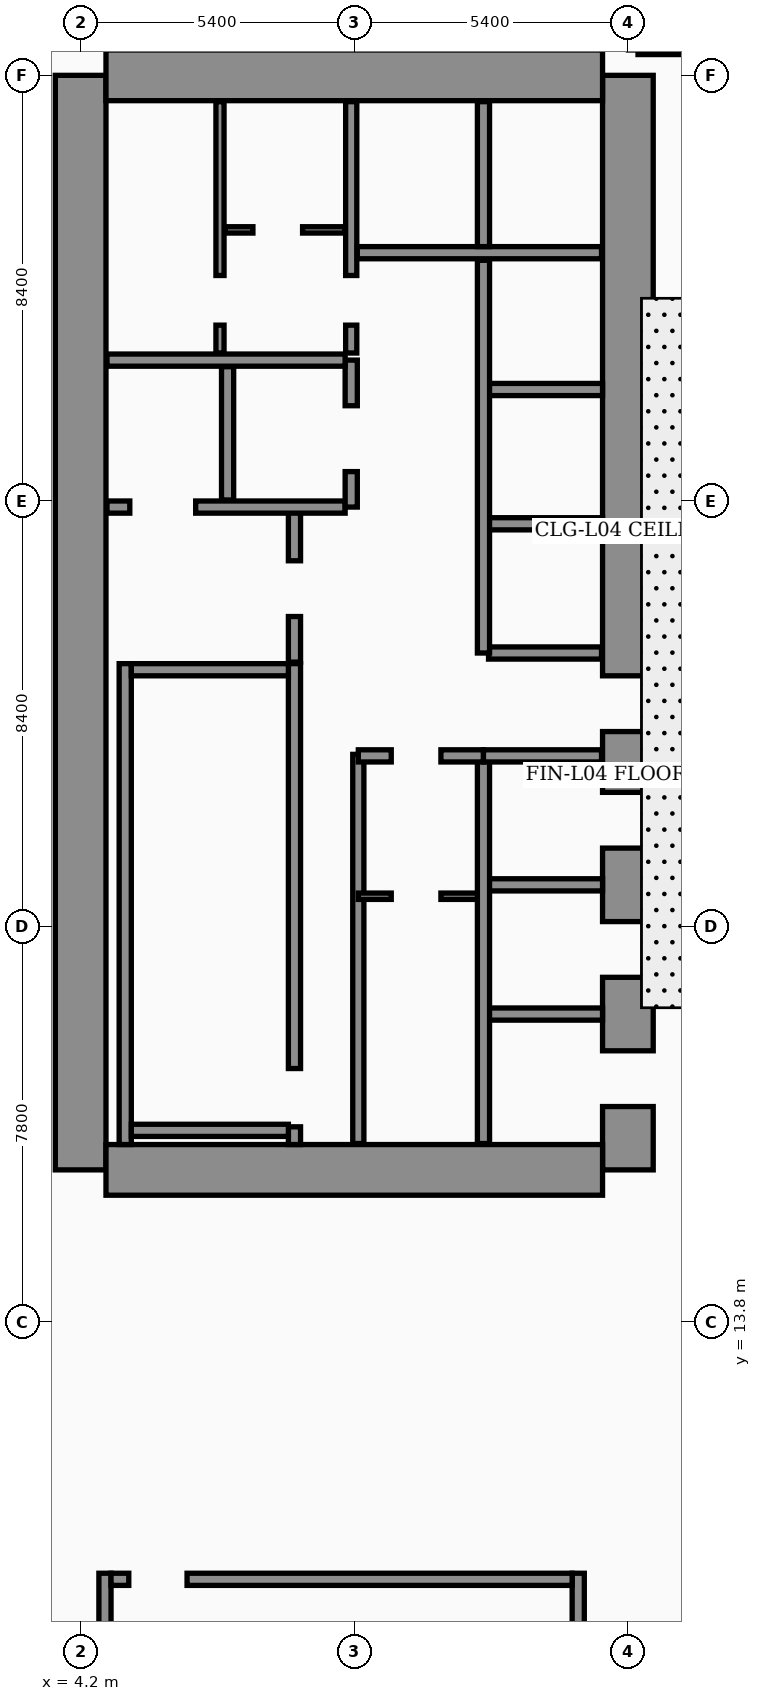
"""IFC4 building model, lengths in metres.
Left out: names, types, materials, properties, quantities, classifications, styles, units other than length and angle.
Written with IfcOpenShell. Run it as: python <this file> out.ifc"""

import sys

from ifc_helpers import new_model, si_unit, direction, frame, frame_2d, origin, place, context, subcontext, project, spatial, rectangle, extrude, element, fill, save


model = new_model("IFC4")
c1 = context("Model", 3, precision=1e-05, world=origin(), true_north=direction((0.0, 1.0)))
c2 = subcontext(c1, "Body", "Model", "MODEL_VIEW")
j1 = project(units=[si_unit("LENGTHUNIT", "METRE"), si_unit("PLANEANGLEUNIT", "RADIAN")], contexts=[c1])
p1 = place(None, origin())
s1 = spatial("IfcSite", under=j1, at=p1, CompositionType="ELEMENT")
p2 = place(p1, origin())
s2 = spatial("IfcBuilding", under=s1, at=p2, CompositionType="ELEMENT")
p3 = place(p2, frame((0.0, 0.0, 22.0)))
s3 = spatial("IfcBuildingStorey", under=s2, at=p3, CompositionType="ELEMENT", Elevation=22.0)
p4 = place(p3, frame((4.2, 16.8, 0.0), z_axis=(0.0, 0.0, 1.0), x_axis=(0.0, 1.0, 0.0)))
e1 = element("IfcWall", 1, at=p4, inside=s3, PredefinedType="SHEAR", context=c2, shape_type="SweptSolid", body=[
    extrude(rectangle(XDim=21.6, YDim=1.0, at=frame_2d((10.8, 0.0))), origin(), (0.0, 0.0, 1.0), 4.76),
])
p5 = place(p3, frame((15.0, 16.8, 0.0), z_axis=(0.0, 0.0, 1.0), x_axis=(0.0, 1.0, 0.0)))
e2 = element("IfcWall", 2, at=p5, inside=s3, PredefinedType="SHEAR", context=c2, shape_type="SweptSolid", body=[
    extrude(rectangle(XDim=21.6, YDim=1.0, at=frame_2d((10.8, 0.0))), origin(), (0.0, 0.0, 1.0), 4.76),
])
p6 = place(p5, frame((8.65, 0.0, 0.0)))
e3 = element("IfcOpeningElement", 3, at=p6, cuts=e2, PredefinedType="OPENING", context=c2, shape_type="SweptSolid", body=[
    extrude(rectangle(XDim=1.1, YDim=2.2, at=frame_2d((0.55, 1.1))), frame((0.0, 0.51, 0.0), z_axis=(0.0, -1.0, 0.0), x_axis=(1.0, 0.0, 0.0)), (0.0, 0.0, 1.0), 1.02),
])
p7 = place(p5, frame((1.25, 0.0, 0.0)))
e4 = element("IfcOpeningElement", 4, at=p7, cuts=e2, PredefinedType="OPENING", context=c2, shape_type="SweptSolid", body=[
    extrude(rectangle(XDim=1.1, YDim=2.2, at=frame_2d((0.55, 1.1))), frame((0.0, 0.51, 0.0), z_axis=(0.0, -1.0, 0.0), x_axis=(1.0, 0.0, 0.0)), (0.0, 0.0, 1.0), 1.02),
])
p8 = place(p5, frame((3.8, 0.0, 0.0)))
e5 = element("IfcOpeningElement", 5, at=p8, cuts=e2, PredefinedType="OPENING", context=c2, shape_type="SweptSolid", body=[
    extrude(rectangle(XDim=1.1, YDim=2.2, at=frame_2d((0.55, 1.1))), frame((0.0, 0.51, 0.0), z_axis=(0.0, -1.0, 0.0), x_axis=(1.0, 0.0, 0.0)), (0.0, 0.0, 1.0), 1.02),
])
p9 = place(p5, frame((6.35, 0.0, 0.0)))
e6 = element("IfcOpeningElement", 6, at=p9, cuts=e2, PredefinedType="OPENING", context=c2, shape_type="SweptSolid", body=[
    extrude(rectangle(XDim=1.1, YDim=2.2, at=frame_2d((0.55, 1.1))), frame((0.0, 0.51, 0.0), z_axis=(0.0, -1.0, 0.0), x_axis=(1.0, 0.0, 0.0)), (0.0, 0.0, 1.0), 1.02),
])
for number, where, z_axis, x_axis in (
    (7, (4.7, 38.4, 0.0), (0.0, 0.0, 1.0), (1.0, 0.0, 0.0)),
    (8, (4.7, 16.8, 0.0), (0.0, 0.0, 1.0), (1.0, 0.0, 0.0)),
):
    element("IfcWall", number, at=place(p3, frame(where, z_axis=z_axis, x_axis=x_axis)), inside=s3, PredefinedType="SHEAR", context=c2, shape_type="SweptSolid", body=[
        extrude(rectangle(XDim=9.8, YDim=1.0, at=frame_2d((4.9, 0.0))), origin(), (0.0, 0.0, 1.0), 4.76),
    ])
p10 = place(p3, frame((5.08, 17.3, 0.0), z_axis=(0.0, 0.0, 1.0), x_axis=(0.0, 1.0, 0.0)))
e9 = element("IfcWall", 9, at=p10, inside=s3, PredefinedType="SOLIDWALL", context=c2, shape_type="SweptSolid", body=[
    extrude(rectangle(XDim=9.49, YDim=0.24, at=frame_2d((4.745, 0.0))), origin(), (0.0, 0.0, 1.0), 4.76),
])
p11 = place(p3, frame((8.42, 17.3, 0.0), z_axis=(0.0, 0.0, 1.0), x_axis=(0.0, 1.0, 0.0)))
e10 = element("IfcWall", 10, at=p11, inside=s3, PredefinedType="SOLIDWALL", context=c2, shape_type="SweptSolid", body=[
    extrude(rectangle(XDim=9.49, YDim=0.24, at=frame_2d((4.745, 0.0))), origin(), (0.0, 0.0, 1.0), 4.76),
])
p12 = place(p11, frame((0.35, 0.0, 0.0)))
e11 = element("IfcOpeningElement", 11, at=p12, cuts=e10, PredefinedType="OPENING", context=c2, shape_type="SweptSolid", body=[
    extrude(rectangle(XDim=1.15, YDim=2.2, at=frame_2d((0.575, 1.1))), frame((0.0, 0.13, 0.0), z_axis=(0.0, -1.0, 0.0), x_axis=(1.0, 0.0, 0.0)), (0.0, 0.0, 1.0), 0.26),
])
for number, where, z_axis, x_axis in (
    (12, (5.2, 17.58, 0.0), (0.0, 0.0, 1.0), (1.0, 0.0, 0.0)),
    (13, (5.2, 26.67, 0.0), (0.0, 0.0, 1.0), (1.0, 0.0, 0.0)),
):
    element("IfcWall", number, at=place(p3, frame(where, z_axis=z_axis, x_axis=x_axis)), inside=s3, PredefinedType="SOLIDWALL", context=c2, shape_type="SweptSolid", body=[
        extrude(rectangle(XDim=3.1, YDim=0.24, at=frame_2d((1.55, 0.0))), origin(), (0.0, 0.0, 1.0), 4.76),
    ])
for number, where, z_axis, x_axis in (
    (14, (4.68, 4.96, 0.0), (0.0, 0.0, 1.0), (0.0, 1.0, 0.0)),
    (15, (14.02, 4.96, 0.0), (0.0, 0.0, 1.0), (0.0, 1.0, 0.0)),
):
    element("IfcWall", number, at=place(p3, frame(where, z_axis=z_axis, x_axis=x_axis)), inside=s3, PredefinedType="SOLIDWALL", context=c2, shape_type="SweptSolid", body=[
        extrude(rectangle(XDim=3.88, YDim=0.24, at=frame_2d((1.94, 0.0))), origin(), (0.0, 0.0, 1.0), 4.76),
    ])
p13 = place(p3, frame((4.8, 8.72, 0.0), z_axis=(0.0, 0.0, 1.0), x_axis=(1.0, 0.0, 0.0)))
e16 = element("IfcWall", 16, at=p13, inside=s3, PredefinedType="SOLIDWALL", context=c2, shape_type="SweptSolid", body=[
    extrude(rectangle(XDim=9.1, YDim=0.24, at=frame_2d((4.55, 0.0))), origin(), (0.0, 0.0, 1.0), 4.76),
])
p14 = place(p13, frame((0.35, 0.0, 0.0)))
e17 = element("IfcOpeningElement", 17, at=p14, cuts=e16, PredefinedType="OPENING", context=c2, shape_type="SweptSolid", body=[
    extrude(rectangle(XDim=1.15, YDim=2.2, at=frame_2d((0.575, 1.1))), frame((0.0, 0.13, 0.0), z_axis=(0.0, -1.0, 0.0), x_axis=(1.0, 0.0, 0.0)), (0.0, 0.0, 1.0), 0.26),
])
for number, where, z_axis, x_axis in (
    (18, (12.18, 19.875, 0.0), (0.0, 0.0, 1.0), (1.0, 0.0, 0.0)),
    (19, (12.18, 22.425, 0.0), (0.0, 0.0, 1.0), (1.0, 0.0, 0.0)),
    (20, (12.18, 29.55, 0.0), (0.0, 0.0, 1.0), (1.0, 0.0, 0.0)),
    (21, (12.18, 32.2, 0.0), (0.0, 0.0, 1.0), (1.0, 0.0, 0.0)),
):
    element("IfcWall", number, at=place(p3, frame(where, z_axis=z_axis, x_axis=x_axis)), inside=s3, PredefinedType="SOLIDWALL", context=c2, shape_type="SweptSolid", body=[
        extrude(rectangle(XDim=2.32, YDim=0.24, at=frame_2d((1.16, 0.0))), origin(), (0.0, 0.0, 1.0), 4.76),
    ])
p15 = place(p3, frame((8.42, 26.82, 0.0), z_axis=(0.0, 0.0, 1.0), x_axis=(0.0, 1.0, 0.0)))
e22 = element("IfcWall", 22, at=p15, inside=s3, PredefinedType="SOLIDWALL", context=c2, shape_type="SweptSolid", body=[
    extrude(rectangle(XDim=3.0, YDim=0.24, at=frame_2d((1.5, 0.0))), origin(), (0.0, 0.0, 1.0), 4.76),
])
p16 = place(p15, frame((0.9, 0.0, 0.0)))
e23 = element("IfcOpeningElement", 23, at=p16, cuts=e22, PredefinedType="OPENING", context=c2, shape_type="SweptSolid", body=[
    extrude(rectangle(XDim=1.1, YDim=2.2, at=frame_2d((0.55, 1.1))), frame((0.0, 0.13, 0.0), z_axis=(0.0, -1.0, 0.0), x_axis=(1.0, 0.0, 0.0)), (0.0, 0.0, 1.0), 0.26),
])
p17 = place(p3, frame((4.72, 29.88, 0.0), z_axis=(0.0, 0.0, 1.0), x_axis=(1.0, 0.0, 0.0)))
e24 = element("IfcWall", 24, at=p17, inside=s3, PredefinedType="SOLIDWALL", context=c2, shape_type="SweptSolid", body=[
    extrude(rectangle(XDim=4.7, YDim=0.24, at=frame_2d((2.35, 0.0))), origin(), (0.0, 0.0, 1.0), 4.76),
])
p18 = place(p17, frame((0.45, 0.0, 0.0)))
e25 = element("IfcOpeningElement", 25, at=p18, cuts=e24, PredefinedType="OPENING", context=c2, shape_type="SweptSolid", body=[
    extrude(rectangle(XDim=1.3, YDim=2.35, at=frame_2d((0.65, 1.175))), frame((0.0, 0.13, 0.0), z_axis=(0.0, -1.0, 0.0), x_axis=(1.0, 0.0, 0.0)), (0.0, 0.0, 1.0), 0.26),
])
p19 = place(p3, frame((7.1, 30.02, 0.0), z_axis=(0.0, 0.0, 1.0), x_axis=(0.0, 1.0, 0.0)))
e26 = element("IfcWall", 26, at=p19, inside=s3, PredefinedType="SOLIDWALL", context=c2, shape_type="SweptSolid", body=[
    extrude(rectangle(XDim=2.63, YDim=0.24, at=frame_2d((1.315, 0.0))), origin(), (0.0, 0.0, 1.0), 4.76),
])
p20 = place(p3, frame((9.54, 29.88, 0.0), z_axis=(0.0, 0.0, 1.0), x_axis=(0.0, 1.0, 0.0)))
e27 = element("IfcWall", 27, at=p20, inside=s3, PredefinedType="SOLIDWALL", context=c2, shape_type="SweptSolid", body=[
    extrude(rectangle(XDim=2.9, YDim=0.24, at=frame_2d((1.45, 0.0))), origin(), (0.0, 0.0, 1.0), 4.76),
])
p21 = place(p20, frame((0.7, 0.0, 0.0)))
e28 = element("IfcOpeningElement", 28, at=p21, cuts=e27, PredefinedType="OPENING", context=c2, shape_type="SweptSolid", body=[
    extrude(rectangle(XDim=1.3, YDim=2.35, at=frame_2d((0.65, 1.175))), frame((0.0, 0.13, 0.0), z_axis=(0.0, -1.0, 0.0), x_axis=(1.0, 0.0, 0.0)), (0.0, 0.0, 1.0), 0.26),
])
p22 = place(p3, frame((4.72, 32.78, 0.0), z_axis=(0.0, 0.0, 1.0), x_axis=(1.0, 0.0, 0.0)))
e29 = element("IfcWall", 29, at=p22, inside=s3, PredefinedType="SOLIDWALL", context=c2, shape_type="SweptSolid", body=[
    extrude(rectangle(XDim=4.7, YDim=0.24, at=frame_2d((2.35, 0.0))), origin(), (0.0, 0.0, 1.0), 4.76),
])
p23 = place(p3, frame((9.68, 17.32, 0.0), z_axis=(0.0, 0.0, 1.0), x_axis=(0.0, 1.0, 0.0)))
e30 = element("IfcWall", 30, at=p23, inside=s3, PredefinedType="SOLIDWALL", context=c2, shape_type="SweptSolid", body=[
    extrude(rectangle(XDim=7.68, YDim=0.22, at=frame_2d((3.84, 0.0))), origin(), (0.0, 0.0, 1.0), 4.76),
])
p24 = place(p3, frame((6.95, 32.92, 0.0), z_axis=(0.0, 0.0, 1.0), x_axis=(0.0, 1.0, 0.0)))
e31 = element("IfcWall", 31, at=p24, inside=s3, PredefinedType="PARTITIONING", context=c2, shape_type="SweptSolid", body=[
    extrude(rectangle(XDim=4.96, YDim=0.16, at=frame_2d((2.48, 0.0))), origin(), (0.0, 0.0, 1.0), 4.76),
])
p25 = place(p24, frame((0.55, 0.0, 0.0)))
e32 = element("IfcOpeningElement", 32, at=p25, cuts=e31, PredefinedType="OPENING", context=c2, shape_type="SweptSolid", body=[
    extrude(rectangle(XDim=0.98, YDim=2.15, at=frame_2d((0.49, 1.075))), frame((0.0, 0.09, 0.0), z_axis=(0.0, -1.0, 0.0), x_axis=(1.0, 0.0, 0.0)), (0.0, 0.0, 1.0), 0.18),
])
p26 = place(p3, frame((7.05, 35.35, 0.0), z_axis=(0.0, 0.0, 1.0), x_axis=(1.0, 0.0, 0.0)))
e33 = element("IfcWall", 33, at=p26, inside=s3, PredefinedType="PARTITIONING", context=c2, shape_type="SweptSolid", body=[
    extrude(rectangle(XDim=2.37, YDim=0.125, at=frame_2d((1.185, 0.0))), origin(), (0.0, 0.0, 1.0), 4.76),
])
p27 = place(p26, frame((0.55, 0.0, 0.0)))
e34 = element("IfcOpeningElement", 34, at=p27, cuts=e33, PredefinedType="OPENING", context=c2, shape_type="SweptSolid", body=[
    extrude(rectangle(XDim=0.98, YDim=2.15, at=frame_2d((0.49, 1.075))), frame((0.0, 0.073, 0.0), z_axis=(0.0, -1.0, 0.0), x_axis=(1.0, 0.0, 0.0)), (0.0, 0.0, 1.0), 0.145),
])
p28 = place(p3, frame((9.54, 32.92, 0.0), z_axis=(0.0, 0.0, 1.0), x_axis=(0.0, 1.0, 0.0)))
e35 = element("IfcWall", 35, at=p28, inside=s3, PredefinedType="SOLIDWALL", context=c2, shape_type="SweptSolid", body=[
    extrude(rectangle(XDim=4.96, YDim=0.22, at=frame_2d((2.48, 0.0))), origin(), (0.0, 0.0, 1.0), 4.76),
])
p29 = place(p28, frame((0.55, 0.0, 0.0)))
e36 = element("IfcOpeningElement", 36, at=p29, cuts=e35, PredefinedType="OPENING", context=c2, shape_type="SweptSolid", body=[
    extrude(rectangle(XDim=0.98, YDim=2.15, at=frame_2d((0.49, 1.075))), frame((0.0, 0.12, 0.0), z_axis=(0.0, -1.0, 0.0), x_axis=(1.0, 0.0, 0.0)), (0.0, 0.0, 1.0), 0.24),
])
p30 = place(p3, frame((9.68, 22.2, 0.0), z_axis=(0.0, 0.0, 1.0), x_axis=(1.0, 0.0, 0.0)))
e37 = element("IfcWall", 37, at=p30, inside=s3, PredefinedType="PARTITIONING", context=c2, shape_type="SweptSolid", body=[
    extrude(rectangle(XDim=2.47, YDim=0.125, at=frame_2d((1.235, 0.0))), origin(), (0.0, 0.0, 1.0), 4.76),
])
p31 = place(p30, frame((0.65, 0.0, 0.0)))
e38 = element("IfcOpeningElement", 38, at=p31, cuts=e37, PredefinedType="OPENING", context=c2, shape_type="SweptSolid", body=[
    extrude(rectangle(XDim=0.98, YDim=2.15, at=frame_2d((0.49, 1.075))), frame((0.0, 0.073, 0.0), z_axis=(0.0, -1.0, 0.0), x_axis=(1.0, 0.0, 0.0)), (0.0, 0.0, 1.0), 0.145),
])
p32 = place(p3, frame((12.15, 17.32, 0.0), z_axis=(0.0, 0.0, 1.0), x_axis=(0.0, 1.0, 0.0)))
e39 = element("IfcWall", 39, at=p32, inside=s3, PredefinedType="SOLIDWALL", context=c2, shape_type="SweptSolid", body=[
    extrude(rectangle(XDim=7.65, YDim=0.24, at=frame_2d((3.825, 0.0))), origin(), (0.0, 0.0, 1.0), 4.76),
])
p33 = place(p3, frame((9.68, 24.97, 0.0), z_axis=(0.0, 0.0, 1.0), x_axis=(1.0, 0.0, 0.0)))
e40 = element("IfcWall", 40, at=p33, inside=s3, PredefinedType="SOLIDWALL", context=c2, shape_type="SweptSolid", body=[
    extrude(rectangle(XDim=2.47, YDim=0.24, at=frame_2d((1.235, 0.0))), origin(), (0.0, 0.0, 1.0), 4.76),
])
p34 = place(p33, frame((0.65, 0.0, 0.0)))
e41 = element("IfcOpeningElement", 41, at=p34, cuts=e40, PredefinedType="OPENING", context=c2, shape_type="SweptSolid", body=[
    extrude(rectangle(XDim=0.98, YDim=2.15, at=frame_2d((0.49, 1.075))), frame((0.0, 0.13, 0.0), z_axis=(0.0, -1.0, 0.0), x_axis=(1.0, 0.0, 0.0)), (0.0, 0.0, 1.0), 0.26),
])
p35 = place(p3, frame((12.15, 24.97, 0.0), z_axis=(0.0, 0.0, 1.0), x_axis=(1.0, 0.0, 0.0)))
e42 = element("IfcWall", 42, at=p35, inside=s3, PredefinedType="SOLIDWALL", context=c2, shape_type="SweptSolid", body=[
    extrude(rectangle(XDim=2.33, YDim=0.24, at=frame_2d((1.165, 0.0))), origin(), (0.0, 0.0, 1.0), 3.94),
])
p36 = place(p3, frame((12.25, 27.0, 0.0), z_axis=(0.0, 0.0, 1.0), x_axis=(1.0, 0.0, 0.0)))
e43 = element("IfcWall", 43, at=p36, inside=s3, PredefinedType="SOLIDWALL", context=c2, shape_type="SweptSolid", body=[
    extrude(rectangle(XDim=2.23, YDim=0.24, at=frame_2d((1.115, 0.0))), origin(), (0.0, 0.0, 1.0), 4.76),
])
p37 = place(p3, frame((12.15, 27.0, 0.0), z_axis=(0.0, 0.0, 1.0), x_axis=(0.0, 1.0, 0.0)))
e44 = element("IfcWall", 44, at=p37, inside=s3, PredefinedType="SOLIDWALL", context=c2, shape_type="SweptSolid", body=[
    extrude(rectangle(XDim=7.75, YDim=0.24, at=frame_2d((3.875, 0.0))), origin(), (0.0, 0.0, 1.0), 4.76),
])
p38 = place(p3, frame((9.66, 34.9, 0.0), z_axis=(0.0, 0.0, 1.0), x_axis=(1.0, 0.0, 0.0)))
e45 = element("IfcWall", 45, at=p38, inside=s3, PredefinedType="SOLIDWALL", context=c2, shape_type="SweptSolid", body=[
    extrude(rectangle(XDim=4.82, YDim=0.24, at=frame_2d((2.41, 0.0))), origin(), (0.0, 0.0, 1.0), 4.76),
])
p39 = place(p3, frame((12.15, 35.02, 0.0), z_axis=(0.0, 0.0, 1.0), x_axis=(0.0, 1.0, 0.0)))
e46 = element("IfcWall", 46, at=p39, inside=s3, PredefinedType="SOLIDWALL", context=c2, shape_type="SweptSolid", body=[
    extrude(rectangle(XDim=2.86, YDim=0.24, at=frame_2d((1.43, 0.0))), origin(), (0.0, 0.0, 1.0), 4.76),
])
p40 = place(p3, frame((15.2, 38.9, 0.0), z_axis=(0.0, 0.0, 1.0), x_axis=(1.0, 0.0, 0.0)))
e47 = element("IfcWall", 47, at=p40, inside=s3, PredefinedType="PARTITIONING", context=c2, shape_type="SweptSolid", body=[
    extrude(rectangle(XDim=18.1, YDim=0.18, at=frame_2d((9.05, 0.0))), origin(), (0.0, 0.0, 1.0), 3.94),
])
p41 = place(p40, frame((2.2, 0.0, 0.0)))
e48 = element("IfcOpeningElement", 48, at=p41, cuts=e47, PredefinedType="OPENING", context=c2, shape_type="SweptSolid", body=[
    extrude(rectangle(XDim=1.02, YDim=2.2, at=frame_2d((0.51, 1.1))), frame((0.0, 0.1, 0.0), z_axis=(0.0, -1.0, 0.0), x_axis=(1.0, 0.0, 0.0)), (0.0, 0.0, 1.0), 0.2),
])
p42 = place(p40, frame((8.2, 0.0, 0.0)))
e49 = element("IfcOpeningElement", 49, at=p42, cuts=e47, PredefinedType="OPENING", context=c2, shape_type="SweptSolid", body=[
    extrude(rectangle(XDim=1.02, YDim=2.2, at=frame_2d((0.51, 1.1))), frame((0.0, 0.1, 0.0), z_axis=(0.0, -1.0, 0.0), x_axis=(1.0, 0.0, 0.0)), (0.0, 0.0, 1.0), 0.2),
])
p43 = place(p40, frame((14.2, 0.0, 0.0)))
e50 = element("IfcOpeningElement", 50, at=p43, cuts=e47, PredefinedType="OPENING", context=c2, shape_type="SweptSolid", body=[
    extrude(rectangle(XDim=1.02, YDim=2.2, at=frame_2d((0.51, 1.1))), frame((0.0, 0.1, 0.0), z_axis=(0.0, -1.0, 0.0), x_axis=(1.0, 0.0, 0.0)), (0.0, 0.0, 1.0), 0.2),
])
p44 = place(p16, origin())
e51 = element("IfcDoor", 51, at=p44, inside=s3, OperationType="SINGLE_SWING_RIGHT", PredefinedType="DOOR", context=c2, shape_type="SweptSolid", body=[
    extrude(rectangle(XDim=1.1, YDim=2.2, at=frame_2d((0.55, 1.1))), frame((0.0, 0.025, 0.0), z_axis=(0.0, -1.0, 0.0), x_axis=(1.0, 0.0, 0.0)), (0.0, 0.0, 1.0), 0.05),
])
fill(e23, e51)
p45 = place(p18, origin())
e52 = element("IfcDoor", 52, at=p45, inside=s3, OperationType="DOUBLE_DOOR_SLIDING", PredefinedType="DOOR", context=c2, shape_type="SweptSolid", body=[
    extrude(rectangle(XDim=1.3, YDim=2.35, at=frame_2d((0.65, 1.175))), frame((0.0, 0.025, 0.0), z_axis=(0.0, -1.0, 0.0), x_axis=(1.0, 0.0, 0.0)), (0.0, 0.0, 1.0), 0.05),
])
fill(e25, e52)
p46 = place(p21, origin())
e53 = element("IfcDoor", 53, at=p46, inside=s3, OperationType="DOUBLE_DOOR_SLIDING", PredefinedType="DOOR", context=c2, shape_type="SweptSolid", body=[
    extrude(rectangle(XDim=1.3, YDim=2.35, at=frame_2d((0.65, 1.175))), frame((0.0, 0.025, 0.0), z_axis=(0.0, -1.0, 0.0), x_axis=(1.0, 0.0, 0.0)), (0.0, 0.0, 1.0), 0.05),
])
fill(e28, e53)
p47 = place(p25, origin())
e54 = element("IfcDoor", 54, at=p47, inside=s3, OperationType="SINGLE_SWING_LEFT", PredefinedType="DOOR", context=c2, shape_type="SweptSolid", body=[
    extrude(rectangle(XDim=0.98, YDim=2.15, at=frame_2d((0.49, 1.075))), frame((0.0, 0.025, 0.0), z_axis=(0.0, -1.0, 0.0), x_axis=(1.0, 0.0, 0.0)), (0.0, 0.0, 1.0), 0.05),
])
fill(e32, e54)
p48 = place(p27, origin())
e55 = element("IfcDoor", 55, at=p48, inside=s3, OperationType="SINGLE_SWING_RIGHT", PredefinedType="DOOR", context=c2, shape_type="SweptSolid", body=[
    extrude(rectangle(XDim=0.98, YDim=2.15, at=frame_2d((0.49, 1.075))), frame((0.0, 0.025, 0.0), z_axis=(0.0, -1.0, 0.0), x_axis=(1.0, 0.0, 0.0)), (0.0, 0.0, 1.0), 0.05),
])
fill(e34, e55)
p49 = place(p29, origin())
e56 = element("IfcDoor", 56, at=p49, inside=s3, OperationType="SINGLE_SWING_LEFT", PredefinedType="DOOR", context=c2, shape_type="SweptSolid", body=[
    extrude(rectangle(XDim=0.98, YDim=2.15, at=frame_2d((0.49, 1.075))), frame((0.0, 0.025, 0.0), z_axis=(0.0, -1.0, 0.0), x_axis=(1.0, 0.0, 0.0)), (0.0, 0.0, 1.0), 0.05),
])
fill(e36, e56)
p50 = place(p31, origin())
e57 = element("IfcDoor", 57, at=p50, inside=s3, OperationType="SINGLE_SWING_RIGHT", PredefinedType="DOOR", context=c2, shape_type="SweptSolid", body=[
    extrude(rectangle(XDim=0.98, YDim=2.15, at=frame_2d((0.49, 1.075))), frame((0.0, 0.025, 0.0), z_axis=(0.0, -1.0, 0.0), x_axis=(1.0, 0.0, 0.0)), (0.0, 0.0, 1.0), 0.05),
])
fill(e38, e57)
p51 = place(p34, origin())
e58 = element("IfcDoor", 58, at=p51, inside=s3, OperationType="SINGLE_SWING_LEFT", PredefinedType="DOOR", context=c2, shape_type="SweptSolid", body=[
    extrude(rectangle(XDim=0.98, YDim=2.15, at=frame_2d((0.49, 1.075))), frame((0.0, 0.025, 0.0), z_axis=(0.0, -1.0, 0.0), x_axis=(1.0, 0.0, 0.0)), (0.0, 0.0, 1.0), 0.05),
])
fill(e41, e58)
p52 = place(p12, origin())
e59 = element("IfcDoor", 59, at=p52, inside=s3, OperationType="SINGLE_SWING_LEFT", PredefinedType="DOOR", context=c2, shape_type="SweptSolid", body=[
    extrude(rectangle(XDim=1.15, YDim=2.2, at=frame_2d((0.575, 1.1))), frame((0.0, 0.025, 0.0), z_axis=(0.0, -1.0, 0.0), x_axis=(1.0, 0.0, 0.0)), (0.0, 0.0, 1.0), 0.05),
])
fill(e11, e59)
p53 = place(p14, origin())
e60 = element("IfcDoor", 60, at=p53, inside=s3, OperationType="SINGLE_SWING_RIGHT", PredefinedType="DOOR", context=c2, shape_type="SweptSolid", body=[
    extrude(rectangle(XDim=1.15, YDim=2.2, at=frame_2d((0.575, 1.1))), frame((0.0, 0.025, 0.0), z_axis=(0.0, -1.0, 0.0), x_axis=(1.0, 0.0, 0.0)), (0.0, 0.0, 1.0), 0.05),
])
fill(e17, e60)
p54 = place(p6, origin())
e61 = element("IfcDoor", 61, at=p54, inside=s3, OperationType="SINGLE_SWING_LEFT", PredefinedType="DOOR", context=c2, shape_type="SweptSolid", body=[
    extrude(rectangle(XDim=1.1, YDim=2.2, at=frame_2d((0.55, 1.1))), frame((0.0, 0.025, 0.0), z_axis=(0.0, -1.0, 0.0), x_axis=(1.0, 0.0, 0.0)), (0.0, 0.0, 1.0), 0.05),
])
fill(e3, e61)
p55 = place(p7, origin())
e62 = element("IfcDoor", 62, at=p55, inside=s3, OperationType="DOUBLE_DOOR_SLIDING", PredefinedType="DOOR", context=c2, shape_type="SweptSolid", body=[
    extrude(rectangle(XDim=1.1, YDim=2.2, at=frame_2d((0.55, 1.1))), frame((0.0, 0.025, 0.0), z_axis=(0.0, -1.0, 0.0), x_axis=(1.0, 0.0, 0.0)), (0.0, 0.0, 1.0), 0.05),
])
fill(e4, e62)
p56 = place(p8, origin())
e63 = element("IfcDoor", 63, at=p56, inside=s3, OperationType="DOUBLE_DOOR_SLIDING", PredefinedType="DOOR", context=c2, shape_type="SweptSolid", body=[
    extrude(rectangle(XDim=1.1, YDim=2.2, at=frame_2d((0.55, 1.1))), frame((0.0, 0.025, 0.0), z_axis=(0.0, -1.0, 0.0), x_axis=(1.0, 0.0, 0.0)), (0.0, 0.0, 1.0), 0.05),
])
fill(e5, e63)
p57 = place(p9, origin())
e64 = element("IfcDoor", 64, at=p57, inside=s3, OperationType="DOUBLE_DOOR_SLIDING", PredefinedType="DOOR", context=c2, shape_type="SweptSolid", body=[
    extrude(rectangle(XDim=1.1, YDim=2.2, at=frame_2d((0.55, 1.1))), frame((0.0, 0.025, 0.0), z_axis=(0.0, -1.0, 0.0), x_axis=(1.0, 0.0, 0.0)), (0.0, 0.0, 1.0), 0.05),
])
fill(e6, e64)
save(model, sys.argv[1])
